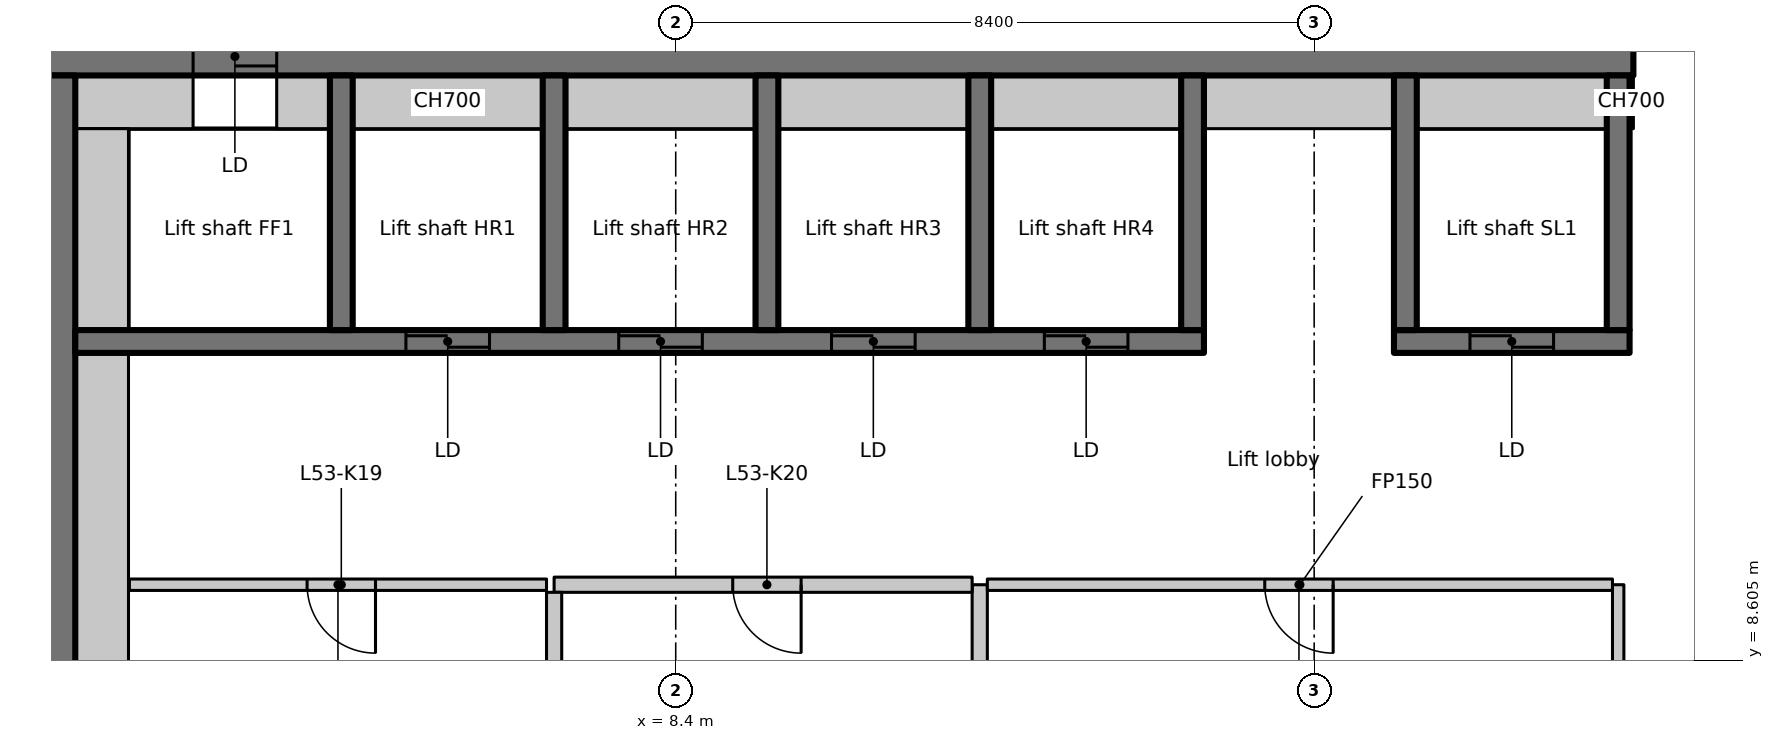
"""IFC4 building model, lengths in metres.
Left out: names, types, materials, properties, quantities, classifications, styles, units other than length and angle.
Written with IfcOpenShell. Run it as: python <this file> out.ifc"""

import sys

from ifc_helpers import new_model, si_unit, direction, frame, frame_2d, origin, place, context, subcontext, project, spatial, rectangle, extrude, element, fill, save


model = new_model("IFC4")
c1 = context("Model", 3, precision=1e-05, world=origin(), true_north=direction((0.0, 1.0)))
c2 = subcontext(c1, "Body", "Model", "MODEL_VIEW")
j1 = project(units=[si_unit("LENGTHUNIT", "METRE"), si_unit("PLANEANGLEUNIT", "RADIAN")], contexts=[c1])
p1 = place(None, origin())
s1 = spatial("IfcSite", under=j1, at=p1, CompositionType="ELEMENT")
p2 = place(p1, origin())
s2 = spatial("IfcBuilding", under=s1, at=p2, CompositionType="ELEMENT")
p3 = place(p2, frame((0.0, 0.0, 210.9)))
s3 = spatial("IfcBuildingStorey", under=s2, at=p3, CompositionType="ELEMENT", Elevation=210.9)
p4 = place(p3, frame((-1.1, 16.55, 0.0), z_axis=(0.0, 0.0, 1.0), x_axis=(1.0, 0.0, 0.0)))
e1 = element("IfcWall", 1, at=p4, inside=s3, PredefinedType="SHEAR", context=c2, shape_type="SweptSolid", body=[
    extrude(rectangle(XDim=22.1, YDim=0.5, at=frame_2d((11.05, 0.0))), origin(), (0.0, 0.0, 1.0), 4.55),
])
p5 = place(p4, frame((3.15, 0.0, 0.0)))
e2 = element("IfcOpeningElement", 2, at=p5, cuts=e1, PredefinedType="OPENING", context=c2, shape_type="SweptSolid", body=[
    extrude(rectangle(XDim=1.1, YDim=2.3, at=frame_2d((0.55, 1.15))), frame((0.0, 0.26, 0.0), z_axis=(0.0, -1.0, 0.0), x_axis=(1.0, 0.0, 0.0)), (0.0, 0.0, 1.0), 0.52),
])
p6 = place(p3, frame((0.25, 7.436, 0.0), z_axis=(0.0, 0.0, 1.0), x_axis=(0.0, 1.0, 0.0)))
e3 = element("IfcWall", 3, at=p6, inside=s3, PredefinedType="SHEAR", context=c2, shape_type="SweptSolid", body=[
    extrude(rectangle(XDim=8.864, YDim=0.5, at=frame_2d((4.432, 0.0))), origin(), (0.0, 0.0, 1.0), 4.55),
])
p7 = place(p3, frame((0.5, 15.95, 0.0), z_axis=(0.0, 0.0, 1.0), x_axis=(1.0, 0.0, 0.0)))
e4 = element("IfcWall", 4, at=p7, inside=s3, PredefinedType="PARTITIONING", context=c2, shape_type="SweptSolid", body=[
    extrude(rectangle(XDim=1.55, YDim=0.7, at=frame_2d((0.775, 0.0))), origin(), (0.0, 0.0, 1.0), 4.55),
])
p8 = place(p3, frame((0.5, 12.8, 0.0), z_axis=(0.0, 0.0, 1.0), x_axis=(1.0, 0.0, 0.0)))
e5 = element("IfcWall", 5, at=p8, inside=s3, PredefinedType="SHEAR", context=c2, shape_type="SweptSolid", body=[
    extrude(rectangle(XDim=14.85, YDim=0.3, at=frame_2d((7.425, 0.0))), origin(), (0.0, 0.0, 1.0), 4.55),
])
p9 = place(p8, frame((4.35, 0.0, 0.0)))
e6 = element("IfcOpeningElement", 6, at=p9, cuts=e5, PredefinedType="OPENING", context=c2, shape_type="SweptSolid", body=[
    extrude(rectangle(XDim=1.1, YDim=2.3, at=frame_2d((0.55, 1.15))), frame((0.0, 0.16, 0.0), z_axis=(0.0, -1.0, 0.0), x_axis=(1.0, 0.0, 0.0)), (0.0, 0.0, 1.0), 0.32),
])
p10 = place(p8, frame((7.15, 0.0, 0.0)))
e7 = element("IfcOpeningElement", 7, at=p10, cuts=e5, PredefinedType="OPENING", context=c2, shape_type="SweptSolid", body=[
    extrude(rectangle(XDim=1.1, YDim=2.3, at=frame_2d((0.55, 1.15))), frame((0.0, 0.16, 0.0), z_axis=(0.0, -1.0, 0.0), x_axis=(1.0, 0.0, 0.0)), (0.0, 0.0, 1.0), 0.32),
])
p11 = place(p8, frame((9.95, 0.0, 0.0)))
e8 = element("IfcOpeningElement", 8, at=p11, cuts=e5, PredefinedType="OPENING", context=c2, shape_type="SweptSolid", body=[
    extrude(rectangle(XDim=1.1, YDim=2.3, at=frame_2d((0.55, 1.15))), frame((0.0, 0.16, 0.0), z_axis=(0.0, -1.0, 0.0), x_axis=(1.0, 0.0, 0.0)), (0.0, 0.0, 1.0), 0.32),
])
p12 = place(p8, frame((12.75, 0.0, 0.0)))
e9 = element("IfcOpeningElement", 9, at=p12, cuts=e5, PredefinedType="OPENING", context=c2, shape_type="SweptSolid", body=[
    extrude(rectangle(XDim=1.1, YDim=2.3, at=frame_2d((0.55, 1.15))), frame((0.0, 0.16, 0.0), z_axis=(0.0, -1.0, 0.0), x_axis=(1.0, 0.0, 0.0)), (0.0, 0.0, 1.0), 0.32),
])
for number, where, z_axis, x_axis in (
    (10, (4.0, 12.95, 0.0), (0.0, 0.0, 1.0), (0.0, 1.0, 0.0)),
    (11, (6.8, 12.95, 0.0), (0.0, 0.0, 1.0), (0.0, 1.0, 0.0)),
    (12, (9.6, 12.95, 0.0), (0.0, 0.0, 1.0), (0.0, 1.0, 0.0)),
    (13, (12.4, 12.95, 0.0), (0.0, 0.0, 1.0), (0.0, 1.0, 0.0)),
    (14, (15.2, 12.95, 0.0), (0.0, 0.0, 1.0), (0.0, 1.0, 0.0)),
):
    element("IfcWall", number, at=place(p3, frame(where, z_axis=z_axis, x_axis=x_axis)), inside=s3, PredefinedType="SHEAR", context=c2, shape_type="SweptSolid", body=[
        extrude(rectangle(XDim=3.35, YDim=0.3, at=frame_2d((1.675, 0.0))), origin(), (0.0, 0.0, 1.0), 4.55),
    ])
p13 = place(p3, frame((17.85, 12.8, 0.0), z_axis=(0.0, 0.0, 1.0), x_axis=(1.0, 0.0, 0.0)))
e15 = element("IfcWall", 15, at=p13, inside=s3, PredefinedType="SHEAR", context=c2, shape_type="SweptSolid", body=[
    extrude(rectangle(XDim=3.1, YDim=0.3, at=frame_2d((1.55, 0.0))), origin(), (0.0, 0.0, 1.0), 4.55),
])
p14 = place(p13, frame((1.0, 0.0, 0.0)))
e16 = element("IfcOpeningElement", 16, at=p14, cuts=e15, PredefinedType="OPENING", context=c2, shape_type="SweptSolid", body=[
    extrude(rectangle(XDim=1.1, YDim=2.3, at=frame_2d((0.55, 1.15))), frame((0.0, 0.16, 0.0), z_axis=(0.0, -1.0, 0.0), x_axis=(1.0, 0.0, 0.0)), (0.0, 0.0, 1.0), 0.32),
])
for number, where, z_axis, x_axis in (
    (17, (18.0, 12.95, 0.0), (0.0, 0.0, 1.0), (0.0, 1.0, 0.0)),
    (18, (20.8, 12.95, 0.0), (0.0, 0.0, 1.0), (0.0, 1.0, 0.0)),
):
    element("IfcWall", number, at=place(p3, frame(where, z_axis=z_axis, x_axis=x_axis)), inside=s3, PredefinedType="SHEAR", context=c2, shape_type="SweptSolid", body=[
        extrude(rectangle(XDim=3.35, YDim=0.3, at=frame_2d((1.675, 0.0))), origin(), (0.0, 0.0, 1.0), 4.55),
    ])
p15 = place(p3, frame((12.4, 7.1, 0.0), z_axis=(0.0, 0.0, 1.0), x_axis=(0.0, 1.0, 0.0)))
e19 = element("IfcWall", 19, at=p15, inside=s3, PredefinedType="PARTITIONING", context=c2, shape_type="SweptSolid", body=[
    extrude(rectangle(XDim=2.5, YDim=0.2, at=frame_2d((1.25, 0.0))), origin(), (0.0, 0.0, 1.0), 4.55),
])
p16 = place(p3, frame((12.3, 9.6, 0.0), z_axis=(0.0, 0.0, 1.0), x_axis=(-1.0, 0.0, 0.0)))
e20 = element("IfcWall", 20, at=p16, inside=s3, PredefinedType="PARTITIONING", context=c2, shape_type="SweptSolid", body=[
    extrude(rectangle(XDim=5.5, YDim=0.2, at=frame_2d((2.75, 0.0))), origin(), (0.0, 0.0, 1.0), 4.55),
])
p17 = place(p16, frame((2.25, 0.0, 0.0)))
e21 = element("IfcOpeningElement", 21, at=p17, cuts=e20, PredefinedType="OPENING", context=c2, shape_type="SweptSolid", body=[
    extrude(rectangle(XDim=0.9, YDim=2.1, at=frame_2d((0.45, 1.05))), frame((0.0, 0.11, 0.0), z_axis=(0.0, -1.0, 0.0), x_axis=(1.0, 0.0, 0.0)), (0.0, 0.0, 1.0), 0.22),
])
p18 = place(p3, frame((6.8, 9.5, 0.0), z_axis=(0.0, 0.0, 1.0), x_axis=(0.0, -1.0, 0.0)))
e22 = element("IfcWall", 22, at=p18, inside=s3, PredefinedType="PARTITIONING", context=c2, shape_type="SweptSolid", body=[
    extrude(rectangle(XDim=2.4, YDim=0.2, at=frame_2d((1.2, 0.0))), origin(), (0.0, 0.0, 1.0), 4.55),
])
p19 = place(p3, frame((6.7, 9.6, 0.0), z_axis=(0.0, 0.0, 1.0), x_axis=(-1.0, 0.0, 0.0)))
e23 = element("IfcWall", 23, at=p19, inside=s3, PredefinedType="PARTITIONING", context=c2, shape_type="SweptSolid", body=[
    extrude(rectangle(XDim=5.488, YDim=0.15, at=frame_2d((2.744, 0.0))), origin(), (0.0, 0.0, 1.0), 4.55),
])
p20 = place(p19, frame((2.25, 0.0, 0.0)))
e24 = element("IfcOpeningElement", 24, at=p20, cuts=e23, PredefinedType="OPENING", context=c2, shape_type="SweptSolid", body=[
    extrude(rectangle(XDim=0.9, YDim=2.1, at=frame_2d((0.45, 1.05))), frame((0.0, 0.085, 0.0), z_axis=(0.0, -1.0, 0.0), x_axis=(1.0, 0.0, 0.0)), (0.0, 0.0, 1.0), 0.17),
])
p21 = place(p3, frame((20.8, 7.075, 0.0), z_axis=(0.0, 0.0, 1.0), x_axis=(0.0, 1.0, 0.0)))
e25 = element("IfcWall", 25, at=p21, inside=s3, PredefinedType="PARTITIONING", context=c2, shape_type="SweptSolid", body=[
    extrude(rectangle(XDim=2.525, YDim=0.15, at=frame_2d((1.263, 0.0))), origin(), (0.0, 0.0, 1.0), 4.55),
])
p22 = place(p3, frame((20.725, 9.6, 0.0), z_axis=(0.0, 0.0, 1.0), x_axis=(-1.0, 0.0, 0.0)))
e26 = element("IfcWall", 26, at=p22, inside=s3, PredefinedType="PARTITIONING", context=c2, shape_type="SweptSolid", body=[
    extrude(rectangle(XDim=8.225, YDim=0.15, at=frame_2d((4.113, 0.0))), origin(), (0.0, 0.0, 1.0), 4.55),
])
p23 = place(p22, frame((3.675, 0.0, 0.0)))
e27 = element("IfcOpeningElement", 27, at=p23, cuts=e26, PredefinedType="OPENING", context=c2, shape_type="SweptSolid", body=[
    extrude(rectangle(XDim=0.9, YDim=2.1, at=frame_2d((0.45, 1.05))), frame((0.0, 0.085, 0.0), z_axis=(0.0, -1.0, 0.0), x_axis=(1.0, 0.0, 0.0)), (0.0, 0.0, 1.0), 0.17),
])
p24 = place(p3, frame((0.85, 7.436, 0.0), z_axis=(0.0, 0.0, 1.0), x_axis=(0.0, 1.0, 0.0)))
e28 = element("IfcWall", 28, at=p24, inside=s3, PredefinedType="PARTITIONING", context=c2, shape_type="SweptSolid", body=[
    extrude(rectangle(XDim=5.214, YDim=0.7, at=frame_2d((2.607, 0.0))), origin(), (0.0, 0.0, 1.0), 4.55),
])
p25 = place(p3, frame((0.85, 12.95, 0.0), z_axis=(0.0, 0.0, 1.0), x_axis=(0.0, 1.0, 0.0)))
e29 = element("IfcWall", 29, at=p25, inside=s3, PredefinedType="PARTITIONING", context=c2, shape_type="SweptSolid", body=[
    extrude(rectangle(XDim=2.65, YDim=0.7, at=frame_2d((1.325, 0.0))), origin(), (0.0, 0.0, 1.0), 4.55),
])
p26 = place(p3, frame((3.15, 15.95, 0.0), z_axis=(0.0, 0.0, 1.0), x_axis=(1.0, 0.0, 0.0)))
e30 = element("IfcWall", 30, at=p26, inside=s3, PredefinedType="PARTITIONING", context=c2, shape_type="SweptSolid", body=[
    extrude(rectangle(XDim=0.7, YDim=0.7, at=frame_2d((0.35, 0.0))), origin(), (0.0, 0.0, 1.0), 4.55),
])
for number, where, z_axis, x_axis in (
    (31, (4.15, 15.95, 0.0), (0.0, 0.0, 1.0), (1.0, 0.0, 0.0)),
    (32, (6.95, 15.95, 0.0), (0.0, 0.0, 1.0), (1.0, 0.0, 0.0)),
    (33, (9.75, 15.95, 0.0), (0.0, 0.0, 1.0), (1.0, 0.0, 0.0)),
    (34, (12.55, 15.95, 0.0), (0.0, 0.0, 1.0), (1.0, 0.0, 0.0)),
    (35, (15.35, 15.95, 0.0), (0.0, 0.0, 1.0), (1.0, 0.0, 0.0)),
    (36, (18.15, 15.95, 0.0), (0.0, 0.0, 1.0), (1.0, 0.0, 0.0)),
):
    element("IfcWall", number, at=place(p3, frame(where, z_axis=z_axis, x_axis=x_axis)), inside=s3, PredefinedType="PARTITIONING", context=c2, shape_type="SweptSolid", body=[
        extrude(rectangle(XDim=2.5, YDim=0.7, at=frame_2d((1.25, 0.0))), origin(), (0.0, 0.0, 1.0), 4.55),
    ])
p27 = place(p3, frame((20.95, 15.95, 0.0), z_axis=(0.0, 0.0, 1.0), x_axis=(1.0, 0.0, 0.0)))
e37 = element("IfcWall", 37, at=p27, inside=s3, PredefinedType="PARTITIONING", context=c2, shape_type="SweptSolid", body=[
    extrude(rectangle(XDim=0.05, YDim=0.7, at=frame_2d((0.025, 0.0))), origin(), (0.0, 0.0, 1.0), 4.55),
])
p28 = place(p5, origin())
e38 = element("IfcDoor", 38, at=p28, inside=s3, OperationType="SLIDING_TO_LEFT", PredefinedType="DOOR", context=c2, shape_type="SweptSolid", body=[
    extrude(rectangle(XDim=1.1, YDim=2.3, at=frame_2d((0.55, 1.15))), frame((0.0, 0.025, 0.0), z_axis=(0.0, -1.0, 0.0), x_axis=(1.0, 0.0, 0.0)), (0.0, 0.0, 1.0), 0.05),
])
fill(e2, e38)
p29 = place(p9, origin())
e39 = element("IfcDoor", 39, at=p29, inside=s3, OperationType="SLIDING_TO_LEFT", PredefinedType="DOOR", context=c2, shape_type="SweptSolid", body=[
    extrude(rectangle(XDim=1.1, YDim=2.3, at=frame_2d((0.55, 1.15))), frame((0.0, 0.025, 0.0), z_axis=(0.0, -1.0, 0.0), x_axis=(1.0, 0.0, 0.0)), (0.0, 0.0, 1.0), 0.05),
])
fill(e6, e39)
p30 = place(p10, origin())
e40 = element("IfcDoor", 40, at=p30, inside=s3, OperationType="SLIDING_TO_LEFT", PredefinedType="DOOR", context=c2, shape_type="SweptSolid", body=[
    extrude(rectangle(XDim=1.1, YDim=2.3, at=frame_2d((0.55, 1.15))), frame((0.0, 0.025, 0.0), z_axis=(0.0, -1.0, 0.0), x_axis=(1.0, 0.0, 0.0)), (0.0, 0.0, 1.0), 0.05),
])
fill(e7, e40)
p31 = place(p11, origin())
e41 = element("IfcDoor", 41, at=p31, inside=s3, OperationType="SLIDING_TO_LEFT", PredefinedType="DOOR", context=c2, shape_type="SweptSolid", body=[
    extrude(rectangle(XDim=1.1, YDim=2.3, at=frame_2d((0.55, 1.15))), frame((0.0, 0.025, 0.0), z_axis=(0.0, -1.0, 0.0), x_axis=(1.0, 0.0, 0.0)), (0.0, 0.0, 1.0), 0.05),
])
fill(e8, e41)
p32 = place(p12, origin())
e42 = element("IfcDoor", 42, at=p32, inside=s3, OperationType="SLIDING_TO_LEFT", PredefinedType="DOOR", context=c2, shape_type="SweptSolid", body=[
    extrude(rectangle(XDim=1.1, YDim=2.3, at=frame_2d((0.55, 1.15))), frame((0.0, 0.025, 0.0), z_axis=(0.0, -1.0, 0.0), x_axis=(1.0, 0.0, 0.0)), (0.0, 0.0, 1.0), 0.05),
])
fill(e9, e42)
p33 = place(p14, origin())
e43 = element("IfcDoor", 43, at=p33, inside=s3, OperationType="SLIDING_TO_LEFT", PredefinedType="DOOR", context=c2, shape_type="SweptSolid", body=[
    extrude(rectangle(XDim=1.1, YDim=2.3, at=frame_2d((0.55, 1.15))), frame((0.0, 0.025, 0.0), z_axis=(0.0, -1.0, 0.0), x_axis=(1.0, 0.0, 0.0)), (0.0, 0.0, 1.0), 0.05),
])
fill(e16, e43)
p34 = place(p20, origin())
e44 = element("IfcDoor", 44, at=p34, inside=s3, OperationType="SINGLE_SWING_LEFT", PredefinedType="DOOR", context=c2, shape_type="SweptSolid", body=[
    extrude(rectangle(XDim=0.9, YDim=2.1, at=frame_2d((0.45, 1.05))), frame((0.0, 0.025, 0.0), z_axis=(0.0, -1.0, 0.0), x_axis=(1.0, 0.0, 0.0)), (0.0, 0.0, 1.0), 0.05),
])
fill(e24, e44)
p35 = place(p17, origin())
e45 = element("IfcDoor", 45, at=p35, inside=s3, OperationType="SINGLE_SWING_RIGHT", PredefinedType="DOOR", context=c2, shape_type="SweptSolid", body=[
    extrude(rectangle(XDim=0.9, YDim=2.1, at=frame_2d((0.45, 1.05))), frame((0.0, 0.025, 0.0), z_axis=(0.0, -1.0, 0.0), x_axis=(1.0, 0.0, 0.0)), (0.0, 0.0, 1.0), 0.05),
])
fill(e21, e45)
p36 = place(p23, origin())
e46 = element("IfcDoor", 46, at=p36, inside=s3, OperationType="SINGLE_SWING_LEFT", PredefinedType="DOOR", context=c2, shape_type="SweptSolid", body=[
    extrude(rectangle(XDim=0.9, YDim=2.1, at=frame_2d((0.45, 1.05))), frame((0.0, 0.025, 0.0), z_axis=(0.0, -1.0, 0.0), x_axis=(1.0, 0.0, 0.0)), (0.0, 0.0, 1.0), 0.05),
])
fill(e27, e46)
save(model, sys.argv[1])
